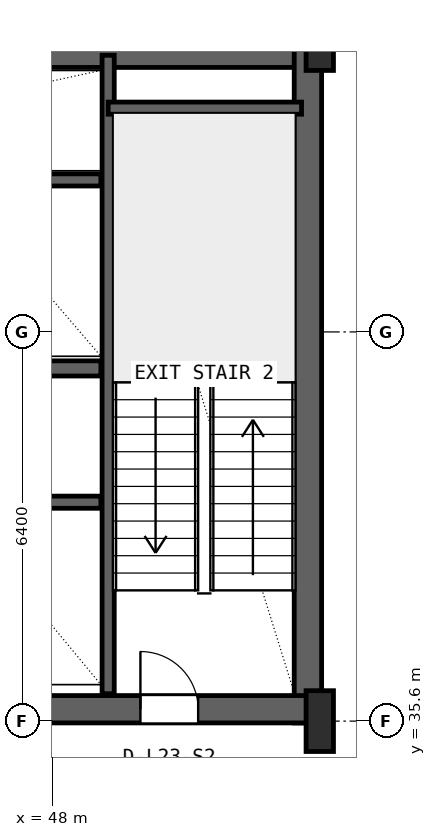
"""IFC4 building model, lengths in metres.
Left out: names, types, materials, properties, quantities, classifications, styles, units other than length and angle.
Written with IfcOpenShell. Run it as: python <this file> out.ifc"""

import sys

from ifc_helpers import new_model, si_unit, direction, frame, frame_2d, origin, origin_2d, place, context, subcontext, project, spatial, rectangle, i_section, extrude, source, transform, mapped, element, fill, save


model = new_model("IFC4")
c1 = context("Model", 3, precision=1e-05, world=origin(), true_north=direction((0.0, 1.0)))
c2 = subcontext(c1, "Body", "Model", "MODEL_VIEW")
j1 = project(units=[si_unit("LENGTHUNIT", "METRE"), si_unit("PLANEANGLEUNIT", "RADIAN")], contexts=[c1])
p1 = place(None, origin())
s1 = spatial("IfcSite", under=j1, at=p1, CompositionType="ELEMENT")
p2 = place(p1, origin())
s2 = spatial("IfcBuilding", under=s1, at=p2, CompositionType="ELEMENT")
p3 = place(p2, frame((0.0, 0.0, 98.4)))
s3 = spatial("IfcBuildingStorey", under=s2, at=p3, CompositionType="ELEMENT", Elevation=98.4)
p4 = place(p3, frame((15.6, 46.575, 0.0), z_axis=(0.0, 0.0, 1.0), x_axis=(1.0, 0.0, 0.0)))
e1 = element("IfcWall", 1, at=p4, inside=s3, PredefinedType="SHEAR", context=c2, shape_type="SweptSolid", body=[
    extrude(rectangle(XDim=36.8, YDim=0.45, at=frame_2d((18.4, 0.0))), origin(), (0.0, 0.0, 1.0), 4.35),
])
p5 = place(p3, frame((52.205, 35.57, 0.0), z_axis=(0.0, 0.0, 1.0), x_axis=(0.0, 1.0, 0.0)))
e2 = element("IfcWall", 2, at=p5, inside=s3, PredefinedType="SHEAR", context=c2, shape_type="SweptSolid", body=[
    extrude(rectangle(XDim=11.23, YDim=0.45, at=frame_2d((5.615, 0.0))), origin(), (0.0, 0.0, 1.0), 4.35),
])
p6 = place(p3, frame((43.2, 35.795, 0.0), z_axis=(0.0, 0.0, 1.0), x_axis=(1.0, 0.0, 0.0)))
e3 = element("IfcWall", 3, at=p6, inside=s3, PredefinedType="SHEAR", context=c2, shape_type="SweptSolid", body=[
    extrude(rectangle(XDim=9.23, YDim=0.45, at=frame_2d((4.615, 0.0))), origin(), (0.0, 0.0, 1.0), 4.35),
])
p7 = place(p6, frame((6.25, 0.0, 0.0)))
e4 = element("IfcOpeningElement", 4, at=p7, cuts=e3, PredefinedType="OPENING", context=c2, shape_type="SweptSolid", body=[
    extrude(rectangle(XDim=0.95, YDim=2.1, at=frame_2d((0.475, 1.05))), frame((0.0, 0.235, 0.0), z_axis=(0.0, -1.0, 0.0), x_axis=(1.0, 0.0, 0.0)), (0.0, 0.0, 1.0), 0.47),
])
m1 = source(origin(), c2, "Body", "SweptSolid", [
    extrude(i_section(OverallWidth=0.45, OverallDepth=1.0, WebThickness=0.016, FlangeThickness=0.03, FilletRadius=0.016, at=origin_2d()), origin(), (0.0, 0.0, 1.0), 4.6),
])
for number, where, z_axis, x_axis in (
    (5, (52.4, 35.6, 0.0), (0.0, 0.0, 1.0), (1.0, 0.0, 0.0)),
    (6, (52.4, 46.8, 0.0), (0.0, 0.0, 1.0), (1.0, 0.0, 0.0)),
):
    element("IfcColumn", number, at=place(p3, frame(where, z_axis=z_axis, x_axis=x_axis)), inside=s3, PredefinedType="COLUMN", context=c2, shape_type="MappedRepresentation", body=[
        mapped(m1, transform((0.0, 0.0, 0.0), x_axis=(1.0, 0.0, 0.0), y_axis=(0.0, 1.0, 0.0), z_axis=(0.0, 0.0, 1.0), scale=1.0)),
    ])
p8 = place(p3, frame((48.92, 36.05, 0.0), z_axis=(0.0, 0.0, 1.0), x_axis=(0.0, 1.0, 0.0)))
e7 = element("IfcWall", 7, at=p8, inside=s3, PredefinedType="SHEAR", context=c2, shape_type="SweptSolid", body=[
    extrude(rectangle(XDim=10.5, YDim=0.2, at=frame_2d((5.25, 0.0))), origin(), (0.0, 0.0, 1.0), 4.35),
])
p9 = place(p3, frame((48.92, 45.68, 0.0), z_axis=(0.0, 0.0, 1.0), x_axis=(1.0, 0.0, 0.0)))
e8 = element("IfcWall", 8, at=p9, inside=s3, PredefinedType="SHEAR", context=c2, shape_type="SweptSolid", body=[
    extrude(rectangle(XDim=3.18, YDim=0.2, at=frame_2d((1.59, 0.0))), origin(), (0.0, 0.0, 1.0), 4.35),
])
p10 = place(p3, frame((24.98, 41.4, 0.0), z_axis=(0.0, 0.0, 1.0), x_axis=(1.0, 0.0, 0.0)))
e9 = element("IfcWall", 9, at=p10, inside=s3, PredefinedType="SHEAR", context=c2, shape_type="SweptSolid", body=[
    extrude(rectangle(XDim=23.82, YDim=0.25, at=frame_2d((11.91, 0.0))), origin(), (0.0, 0.0, 1.0), 4.35),
])
p11 = place(p10, frame((0.87, 0.0, 0.0)))
e10 = element("IfcOpeningElement", 10, at=p11, cuts=e9, PredefinedType="OPENING", context=c2, shape_type="SweptSolid", body=[
    extrude(rectangle(XDim=1.1, YDim=2.18, at=frame_2d((0.55, 1.09))), frame((0.0, 0.135, 0.0), z_axis=(0.0, -1.0, 0.0), x_axis=(1.0, 0.0, 0.0)), (0.0, 0.0, 1.0), 0.27),
])
p12 = place(p10, frame((3.47, 0.0, 0.0)))
e11 = element("IfcOpeningElement", 11, at=p12, cuts=e9, PredefinedType="OPENING", context=c2, shape_type="SweptSolid", body=[
    extrude(rectangle(XDim=1.1, YDim=2.18, at=frame_2d((0.55, 1.09))), frame((0.0, 0.135, 0.0), z_axis=(0.0, -1.0, 0.0), x_axis=(1.0, 0.0, 0.0)), (0.0, 0.0, 1.0), 0.27),
])
p13 = place(p10, frame((6.07, 0.0, 0.0)))
e12 = element("IfcOpeningElement", 12, at=p13, cuts=e9, PredefinedType="OPENING", context=c2, shape_type="SweptSolid", body=[
    extrude(rectangle(XDim=1.1, YDim=2.18, at=frame_2d((0.55, 1.09))), frame((0.0, 0.135, 0.0), z_axis=(0.0, -1.0, 0.0), x_axis=(1.0, 0.0, 0.0)), (0.0, 0.0, 1.0), 0.27),
])
p14 = place(p10, frame((8.87, 0.0, 0.0)))
e13 = element("IfcOpeningElement", 13, at=p14, cuts=e9, PredefinedType="OPENING", context=c2, shape_type="SweptSolid", body=[
    extrude(rectangle(XDim=1.1, YDim=2.18, at=frame_2d((0.55, 1.09))), frame((0.0, 0.135, 0.0), z_axis=(0.0, -1.0, 0.0), x_axis=(1.0, 0.0, 0.0)), (0.0, 0.0, 1.0), 0.27),
])
p15 = place(p10, frame((11.47, 0.0, 0.0)))
e14 = element("IfcOpeningElement", 14, at=p15, cuts=e9, PredefinedType="OPENING", context=c2, shape_type="SweptSolid", body=[
    extrude(rectangle(XDim=1.1, YDim=2.18, at=frame_2d((0.55, 1.09))), frame((0.0, 0.135, 0.0), z_axis=(0.0, -1.0, 0.0), x_axis=(1.0, 0.0, 0.0)), (0.0, 0.0, 1.0), 0.27),
])
p16 = place(p10, frame((14.07, 0.0, 0.0)))
e15 = element("IfcOpeningElement", 15, at=p16, cuts=e9, PredefinedType="OPENING", context=c2, shape_type="SweptSolid", body=[
    extrude(rectangle(XDim=1.1, YDim=2.18, at=frame_2d((0.55, 1.09))), frame((0.0, 0.135, 0.0), z_axis=(0.0, -1.0, 0.0), x_axis=(1.0, 0.0, 0.0)), (0.0, 0.0, 1.0), 0.27),
])
p17 = place(p3, frame((41.22, 44.5, 0.0), z_axis=(0.0, 0.0, 1.0), x_axis=(1.0, 0.0, 0.0)))
e16 = element("IfcWall", 16, at=p17, inside=s3, PredefinedType="SHEAR", context=c2, shape_type="SweptSolid", body=[
    extrude(rectangle(XDim=7.58, YDim=0.2, at=frame_2d((3.79, 0.0))), origin(), (0.0, 0.0, 1.0), 4.35),
])
p18 = place(p3, frame((43.65, 39.2, 0.0), z_axis=(0.0, 0.0, 1.0), x_axis=(1.0, 0.0, 0.0)))
e17 = element("IfcWall", 17, at=p18, inside=s3, PredefinedType="SHEAR", context=c2, shape_type="SweptSolid", body=[
    extrude(rectangle(XDim=5.15, YDim=0.2, at=frame_2d((2.575, 0.0))), origin(), (0.0, 0.0, 1.0), 4.35),
])
m2 = source(origin(), c2, "Body", "SweptSolid", [
    extrude(rectangle(XDim=0.95, YDim=2.1, at=frame_2d((0.475, 1.05))), frame((0.0, 0.025, 0.0), z_axis=(0.0, -1.0, 0.0), x_axis=(1.0, 0.0, 0.0)), (0.0, 0.0, 1.0), 0.05),
])
p19 = place(p7, origin())
e18 = element("IfcDoor", 18, at=p19, inside=s3, OperationType="SINGLE_SWING_LEFT", PredefinedType="DOOR", context=c2, shape_type="MappedRepresentation", body=[
    mapped(m2, transform((0.0, 0.0, 0.0), x_axis=(1.0, 0.0, 0.0), y_axis=(0.0, 1.0, 0.0), z_axis=(0.0, 0.0, 1.0), scale=1.0)),
])
fill(e4, e18)
save(model, sys.argv[1])
